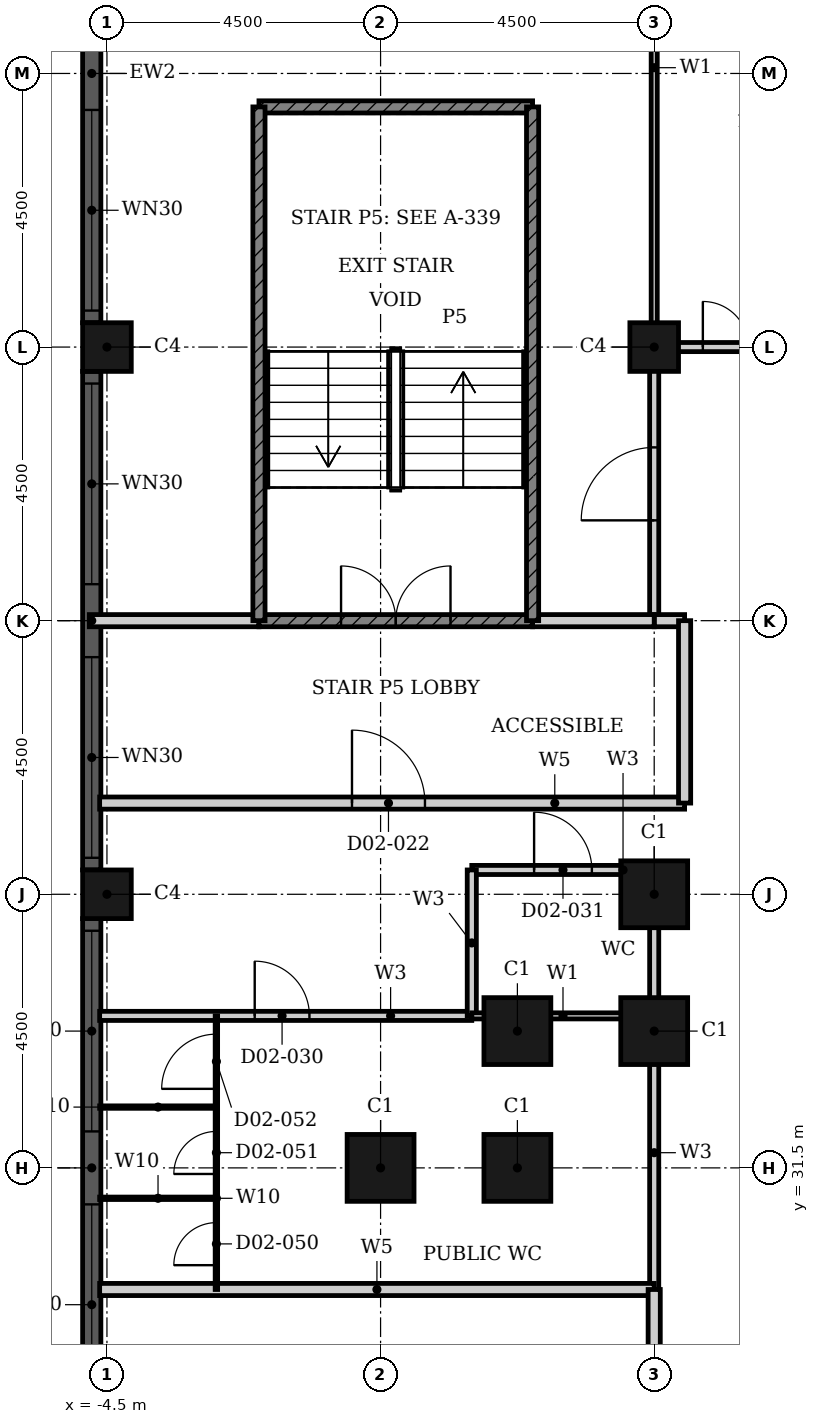
"""IFC4 building model, lengths in metres.
Left out: names, types, materials, properties, quantities, classifications, styles, units other than length and angle.
Written with IfcOpenShell. Run it as: python <this file> out.ifc"""

import sys

from ifc_helpers import new_model, si_unit, direction, frame, frame_2d, origin, origin_2d, place, context, subcontext, project, spatial, rectangle, hollow_rectangle, extrude, element, fill, save


model = new_model("IFC4")
c1 = context("Model", 3, precision=1e-05, world=origin(), true_north=direction((0.0, 1.0)))
c2 = subcontext(c1, "Body", "Model", "MODEL_VIEW")
j1 = project(units=[si_unit("LENGTHUNIT", "METRE"), si_unit("PLANEANGLEUNIT", "RADIAN")], contexts=[c1])
p1 = place(None, origin())
s1 = spatial("IfcSite", under=j1, at=p1, CompositionType="ELEMENT")
p2 = place(p1, origin())
s2 = spatial("IfcBuilding", under=s1, at=p2, CompositionType="ELEMENT")
p3 = place(p2, frame((0.0, 0.0, 12.0)))
s3 = spatial("IfcBuildingStorey", under=s2, at=p3, CompositionType="ELEMENT", Elevation=12.0)
for number, where, z_axis, x_axis in (
    (1, (4.5, 36.0, 0.0), (0.0, 0.0, 1.0), (1.0, 0.0, 0.0)),
    (2, (4.5, 33.75, 0.0), (0.0, 0.0, 1.0), (1.0, 0.0, 0.0)),
    (3, (2.25, 33.75, 0.0), (0.0, 0.0, 1.0), (1.0, 0.0, 0.0)),
    (4, (2.25, 31.5, 0.0), (0.0, 0.0, 1.0), (1.0, 0.0, 0.0)),
    (5, (0.0, 31.5, 0.0), (0.0, 0.0, 1.0), (1.0, 0.0, 0.0)),
):
    element("IfcColumn", number, at=place(p3, frame(where, z_axis=z_axis, x_axis=x_axis)), inside=s3, PredefinedType="COLUMN", context=c2, shape_type="SweptSolid", body=[
        extrude(hollow_rectangle(XDim=1.1, YDim=1.1, WallThickness=0.036, at=origin_2d()), origin(), (0.0, 0.0, 1.0), 5.4),
    ])
for number, where, z_axis, x_axis in (
    (6, (-4.5, 36.0, 0.0), (0.0, 0.0, 1.0), (1.0, 0.0, 0.0)),
    (7, (-4.5, 45.0, 0.0), (0.0, 0.0, 1.0), (1.0, 0.0, 0.0)),
    (8, (4.5, 45.0, 0.0), (0.0, 0.0, 1.0), (1.0, 0.0, 0.0)),
):
    element("IfcColumn", number, at=place(p3, frame(where, z_axis=z_axis, x_axis=x_axis)), inside=s3, PredefinedType="COLUMN", context=c2, shape_type="SweptSolid", body=[
        extrude(hollow_rectangle(XDim=0.8, YDim=0.8, WallThickness=0.025, at=origin_2d()), origin(), (0.0, 0.0, 1.0), 5.4),
    ])
p4 = place(p3, frame((-4.75, 53.6, 0.0), z_axis=(0.0, 0.0, 1.0), x_axis=(0.0, -1.0, 0.0)))
e9 = element("IfcWall", 9, at=p4, inside=s3, PredefinedType="SOLIDWALL", context=c2, shape_type="SweptSolid", body=[
    extrude(rectangle(XDim=8.2, YDim=0.3, at=frame_2d((4.1, 0.0))), origin(), (0.0, 0.0, 1.0), 5.4),
])
p5 = place(p4, frame((0.2, 0.0, 0.9)))
e10 = element("IfcOpeningElement", 10, at=p5, cuts=e9, PredefinedType="OPENING", context=c2, shape_type="SweptSolid", body=[
    extrude(rectangle(XDim=3.3, YDim=3.5, at=frame_2d((1.65, 1.75))), frame((0.0, 0.16, 0.0), z_axis=(0.0, -1.0, 0.0), x_axis=(1.0, 0.0, 0.0)), (0.0, 0.0, 1.0), 0.32),
])
p6 = place(p4, frame((4.7, 0.0, 0.9)))
e11 = element("IfcOpeningElement", 11, at=p6, cuts=e9, PredefinedType="OPENING", context=c2, shape_type="SweptSolid", body=[
    extrude(rectangle(XDim=3.3, YDim=3.5, at=frame_2d((1.65, 1.75))), frame((0.0, 0.16, 0.0), z_axis=(0.0, -1.0, 0.0), x_axis=(1.0, 0.0, 0.0)), (0.0, 0.0, 1.0), 0.32),
])
p7 = place(p3, frame((-4.75, 44.6, 0.0), z_axis=(0.0, 0.0, 1.0), x_axis=(0.0, -1.0, 0.0)))
e12 = element("IfcWall", 12, at=p7, inside=s3, PredefinedType="SOLIDWALL", context=c2, shape_type="SweptSolid", body=[
    extrude(rectangle(XDim=8.2, YDim=0.3, at=frame_2d((4.1, 0.0))), origin(), (0.0, 0.0, 1.0), 5.4),
])
p8 = place(p7, frame((0.2, 0.0, 0.9)))
e13 = element("IfcOpeningElement", 13, at=p8, cuts=e12, PredefinedType="OPENING", context=c2, shape_type="SweptSolid", body=[
    extrude(rectangle(XDim=3.3, YDim=3.5, at=frame_2d((1.65, 1.75))), frame((0.0, 0.16, 0.0), z_axis=(0.0, -1.0, 0.0), x_axis=(1.0, 0.0, 0.0)), (0.0, 0.0, 1.0), 0.32),
])
p9 = place(p7, frame((4.7, 0.0, 0.9)))
e14 = element("IfcOpeningElement", 14, at=p9, cuts=e12, PredefinedType="OPENING", context=c2, shape_type="SweptSolid", body=[
    extrude(rectangle(XDim=3.3, YDim=3.5, at=frame_2d((1.65, 1.75))), frame((0.0, 0.16, 0.0), z_axis=(0.0, -1.0, 0.0), x_axis=(1.0, 0.0, 0.0)), (0.0, 0.0, 1.0), 0.32),
])
p10 = place(p3, frame((-4.75, 35.6, 0.0), z_axis=(0.0, 0.0, 1.0), x_axis=(0.0, -1.0, 0.0)))
e15 = element("IfcWall", 15, at=p10, inside=s3, PredefinedType="SOLIDWALL", context=c2, shape_type="SweptSolid", body=[
    extrude(rectangle(XDim=8.2, YDim=0.3, at=frame_2d((4.1, 0.0))), origin(), (0.0, 0.0, 1.0), 5.4),
])
p11 = place(p10, frame((0.2, 0.0, 0.9)))
e16 = element("IfcOpeningElement", 16, at=p11, cuts=e15, PredefinedType="OPENING", context=c2, shape_type="SweptSolid", body=[
    extrude(rectangle(XDim=3.3, YDim=3.5, at=frame_2d((1.65, 1.75))), frame((0.0, 0.16, 0.0), z_axis=(0.0, -1.0, 0.0), x_axis=(1.0, 0.0, 0.0)), (0.0, 0.0, 1.0), 0.32),
])
p12 = place(p10, frame((4.7, 0.0, 0.9)))
e17 = element("IfcOpeningElement", 17, at=p12, cuts=e15, PredefinedType="OPENING", context=c2, shape_type="SweptSolid", body=[
    extrude(rectangle(XDim=3.3, YDim=3.5, at=frame_2d((1.65, 1.75))), frame((0.0, 0.16, 0.0), z_axis=(0.0, -1.0, 0.0), x_axis=(1.0, 0.0, 0.0)), (0.0, 0.0, 1.0), 0.32),
])
p13 = place(p3, frame((-4.62, 34.0, 0.0), z_axis=(0.0, 0.0, 1.0), x_axis=(1.0, 0.0, 0.0)))
e18 = element("IfcWall", 18, at=p13, inside=s3, PredefinedType="PARTITIONING", context=c2, shape_type="SweptSolid", body=[
    extrude(rectangle(XDim=6.12, YDim=0.15, at=frame_2d((3.06, 0.0))), origin(), (0.0, 0.0, 1.0), 5.05),
])
p14 = place(p13, frame((2.55, 0.0, 0.0)))
e19 = element("IfcOpeningElement", 19, at=p14, cuts=e18, PredefinedType="OPENING", context=c2, shape_type="SweptSolid", body=[
    extrude(rectangle(XDim=0.9, YDim=2.1, at=frame_2d((0.45, 1.05))), frame((0.0, 0.085, 0.0), z_axis=(0.0, -1.0, 0.0), x_axis=(1.0, 0.0, 0.0)), (0.0, 0.0, 1.0), 0.17),
])
p15 = place(p3, frame((1.5, 36.4, 0.0), z_axis=(0.0, 0.0, 1.0), x_axis=(1.0, 0.0, 0.0)))
e20 = element("IfcWall", 20, at=p15, inside=s3, PredefinedType="PARTITIONING", context=c2, shape_type="SweptSolid", body=[
    extrude(rectangle(XDim=3.0, YDim=0.15, at=frame_2d((1.5, 0.0))), origin(), (0.0, 0.0, 1.0), 5.05),
])
p16 = place(p15, frame((1.025, 0.0, 0.0)))
e21 = element("IfcOpeningElement", 21, at=p16, cuts=e20, PredefinedType="OPENING", context=c2, shape_type="SweptSolid", body=[
    extrude(rectangle(XDim=0.95, YDim=2.1, at=frame_2d((0.475, 1.05))), frame((0.0, 0.085, 0.0), z_axis=(0.0, -1.0, 0.0), x_axis=(1.0, 0.0, 0.0)), (0.0, 0.0, 1.0), 0.17),
])
p17 = place(p3, frame((4.5, 45.0, 0.0), z_axis=(0.0, 0.0, 1.0), x_axis=(1.0, 0.0, 0.0)))
e22 = element("IfcWall", 22, at=p17, inside=s3, PredefinedType="PARTITIONING", context=c2, shape_type="SweptSolid", body=[
    extrude(rectangle(XDim=3.1, YDim=0.15, at=frame_2d((1.55, 0.0))), origin(), (0.0, 0.0, 1.0), 5.05),
])
p18 = place(p17, frame((0.8, 0.0, 0.0)))
e23 = element("IfcOpeningElement", 23, at=p18, cuts=e22, PredefinedType="OPENING", context=c2, shape_type="SweptSolid", body=[
    extrude(rectangle(XDim=1.5, YDim=2.4, at=frame_2d((0.75, 1.2))), frame((0.0, 0.085, 0.0), z_axis=(0.0, -1.0, 0.0), x_axis=(1.0, 0.0, 0.0)), (0.0, 0.0, 1.0), 0.17),
])
p19 = place(p3, frame((1.5, 34.0, 0.0), z_axis=(0.0, 0.0, 1.0), x_axis=(0.0, 1.0, 0.0)))
e24 = element("IfcWall", 24, at=p19, inside=s3, PredefinedType="PARTITIONING", context=c2, shape_type="SweptSolid", body=[
    extrude(rectangle(XDim=2.4, YDim=0.15, at=frame_2d((1.2, 0.0))), origin(), (0.0, 0.0, 1.0), 5.05),
])
p20 = place(p3, frame((4.5, 29.5, 0.0), z_axis=(0.0, 0.0, 1.0), x_axis=(0.0, 1.0, 0.0)))
e25 = element("IfcWall", 25, at=p20, inside=s3, PredefinedType="PARTITIONING", context=c2, shape_type="SweptSolid", body=[
    extrude(rectangle(XDim=4.5, YDim=0.15, at=frame_2d((2.25, 0.0))), origin(), (0.0, 0.0, 1.0), 5.05),
])
p21 = place(p3, frame((4.5, 34.0, 0.0), z_axis=(0.0, 0.0, 1.0), x_axis=(0.0, 1.0, 0.0)))
e26 = element("IfcWall", 26, at=p21, inside=s3, PredefinedType="PARTITIONING", context=c2, shape_type="SweptSolid", body=[
    extrude(rectangle(XDim=2.4, YDim=0.15, at=frame_2d((1.2, 0.0))), origin(), (0.0, 0.0, 1.0), 5.05),
])
p22 = place(p3, frame((4.5, 40.5, 0.0), z_axis=(0.0, 0.0, 1.0), x_axis=(0.0, 1.0, 0.0)))
e27 = element("IfcWall", 27, at=p22, inside=s3, PredefinedType="PARTITIONING", context=c2, shape_type="SweptSolid", body=[
    extrude(rectangle(XDim=4.5, YDim=0.15, at=frame_2d((2.25, 0.0))), origin(), (0.0, 0.0, 1.0), 5.05),
])
p23 = place(p22, frame((1.65, 0.0, 0.0)))
e28 = element("IfcOpeningElement", 28, at=p23, cuts=e27, PredefinedType="OPENING", context=c2, shape_type="SweptSolid", body=[
    extrude(rectangle(XDim=1.2, YDim=2.4, at=frame_2d((0.6, 1.2))), frame((0.0, 0.085, 0.0), z_axis=(0.0, -1.0, 0.0), x_axis=(1.0, 0.0, 0.0)), (0.0, 0.0, 1.0), 0.17),
])
p24 = place(p3, frame((1.5, 34.0, 0.0), z_axis=(0.0, 0.0, 1.0), x_axis=(1.0, 0.0, 0.0)))
e29 = element("IfcWall", 29, at=p24, inside=s3, PredefinedType="PARTITIONING", context=c2, shape_type="SweptSolid", body=[
    extrude(rectangle(XDim=3.0, YDim=0.1, at=frame_2d((1.5, 0.0))), origin(), (0.0, 0.0, 1.0), 5.05),
])
p25 = place(p3, frame((4.5, 45.0, 0.0), z_axis=(0.0, 0.0, 1.0), x_axis=(0.0, 1.0, 0.0)))
e30 = element("IfcWall", 30, at=p25, inside=s3, PredefinedType="PARTITIONING", context=c2, shape_type="SweptSolid", body=[
    extrude(rectangle(XDim=9.19, YDim=0.1, at=frame_2d((4.595, 0.0))), origin(), (0.0, 0.0, 1.0), 5.05),
])
p26 = place(p3, frame((-4.62, 29.5, 0.0), z_axis=(0.0, 0.0, 1.0), x_axis=(1.0, 0.0, 0.0)))
e31 = element("IfcWall", 31, at=p26, inside=s3, PredefinedType="PARTITIONING", context=c2, shape_type="SweptSolid", body=[
    extrude(rectangle(XDim=9.12, YDim=0.2, at=frame_2d((4.56, 0.0))), origin(), (0.0, 0.0, 1.0), 5.05),
])
p27 = place(p3, frame((-4.62, 37.5, 0.0), z_axis=(0.0, 0.0, 1.0), x_axis=(1.0, 0.0, 0.0)))
e32 = element("IfcWall", 32, at=p27, inside=s3, PredefinedType="PARTITIONING", context=c2, shape_type="SweptSolid", body=[
    extrude(rectangle(XDim=9.62, YDim=0.2, at=frame_2d((4.81, 0.0))), origin(), (0.0, 0.0, 1.0), 5.05),
])
p28 = place(p27, frame((4.15, 0.0, 0.0)))
e33 = element("IfcOpeningElement", 33, at=p28, cuts=e32, PredefinedType="OPENING", context=c2, shape_type="SweptSolid", body=[
    extrude(rectangle(XDim=1.2, YDim=2.1, at=frame_2d((0.6, 1.05))), frame((0.0, 0.11, 0.0), z_axis=(0.0, -1.0, 0.0), x_axis=(1.0, 0.0, 0.0)), (0.0, 0.0, 1.0), 0.22),
])
p29 = place(p3, frame((4.5, 40.5, 0.0), z_axis=(0.0, 0.0, 1.0), x_axis=(1.0, 0.0, 0.0)))
e34 = element("IfcWall", 34, at=p29, inside=s3, PredefinedType="PARTITIONING", context=c2, shape_type="SweptSolid", body=[
    extrude(rectangle(XDim=0.5, YDim=0.2, at=frame_2d((0.25, 0.0))), origin(), (0.0, 0.0, 1.0), 5.05),
])
p30 = place(p3, frame((-4.79, 40.5, 0.0), z_axis=(0.0, 0.0, 1.0), x_axis=(1.0, 0.0, 0.0)))
e35 = element("IfcWall", 35, at=p30, inside=s3, PredefinedType="PARTITIONING", context=c2, shape_type="SweptSolid", body=[
    extrude(rectangle(XDim=2.79, YDim=0.2, at=frame_2d((1.395, 0.0))), origin(), (0.0, 0.0, 1.0), 5.05),
])
p31 = place(p3, frame((2.5, 40.5, 0.0), z_axis=(0.0, 0.0, 1.0), x_axis=(1.0, 0.0, 0.0)))
e36 = element("IfcWall", 36, at=p31, inside=s3, PredefinedType="PARTITIONING", context=c2, shape_type="SweptSolid", body=[
    extrude(rectangle(XDim=2.0, YDim=0.2, at=frame_2d((1.0, 0.0))), origin(), (0.0, 0.0, 1.0), 5.05),
])
p32 = place(p3, frame((4.5, 17.75, 0.0), z_axis=(0.0, 0.0, 1.0), x_axis=(0.0, 1.0, 0.0)))
e37 = element("IfcWall", 37, at=p32, inside=s3, PredefinedType="PARTITIONING", context=c2, shape_type="SweptSolid", body=[
    extrude(rectangle(XDim=11.75, YDim=0.2, at=frame_2d((5.875, 0.0))), origin(), (0.0, 0.0, 1.0), 5.05),
])
p33 = place(p32, frame((5.375, 0.0, 0.0)))
e38 = element("IfcOpeningElement", 38, at=p33, cuts=e37, PredefinedType="OPENING", context=c2, shape_type="SweptSolid", body=[
    extrude(rectangle(XDim=1.0, YDim=2.1, at=frame_2d((0.5, 1.05))), frame((0.0, 0.11, 0.0), z_axis=(0.0, -1.0, 0.0), x_axis=(1.0, 0.0, 0.0)), (0.0, 0.0, 1.0), 0.22),
])
p34 = place(p3, frame((5.0, 37.5, 0.0), z_axis=(0.0, 0.0, 1.0), x_axis=(0.0, 1.0, 0.0)))
e39 = element("IfcWall", 39, at=p34, inside=s3, PredefinedType="PARTITIONING", context=c2, shape_type="SweptSolid", body=[
    extrude(rectangle(XDim=3.0, YDim=0.2, at=frame_2d((1.5, 0.0))), origin(), (0.0, 0.0, 1.0), 5.05),
])
p35 = place(p3, frame((-2.0, 40.5, 0.0), z_axis=(0.0, 0.0, 1.0), x_axis=(1.0, 0.0, 0.0)))
e40 = element("IfcWall", 40, at=p35, inside=s3, PredefinedType="SHEAR", context=c2, shape_type="SweptSolid", body=[
    extrude(rectangle(XDim=4.5, YDim=0.2, at=frame_2d((2.25, 0.0))), origin(), (0.0, 0.0, 1.0), 5.05),
])
p36 = place(p35, frame((1.35, 0.0, 0.0)))
e41 = element("IfcOpeningElement", 41, at=p36, cuts=e40, PredefinedType="OPENING", context=c2, shape_type="SweptSolid", body=[
    extrude(rectangle(XDim=1.8, YDim=2.1, at=frame_2d((0.9, 1.05))), frame((0.0, 0.11, 0.0), z_axis=(0.0, -1.0, 0.0), x_axis=(1.0, 0.0, 0.0)), (0.0, 0.0, 1.0), 0.22),
])
p37 = place(p3, frame((-2.0, 48.95, 0.0), z_axis=(0.0, 0.0, 1.0), x_axis=(1.0, 0.0, 0.0)))
e42 = element("IfcWall", 42, at=p37, inside=s3, PredefinedType="SHEAR", context=c2, shape_type="SweptSolid", body=[
    extrude(rectangle(XDim=4.5, YDim=0.2, at=frame_2d((2.25, 0.0))), origin(), (0.0, 0.0, 1.0), 5.05),
])
for number, where, z_axis, x_axis in (
    (43, (-2.0, 40.5, 0.0), (0.0, 0.0, 1.0), (0.0, 1.0, 0.0)),
    (44, (2.5, 40.5, 0.0), (0.0, 0.0, 1.0), (0.0, 1.0, 0.0)),
):
    element("IfcWall", number, at=place(p3, frame(where, z_axis=z_axis, x_axis=x_axis)), inside=s3, PredefinedType="SHEAR", context=c2, shape_type="SweptSolid", body=[
        extrude(rectangle(XDim=8.45, YDim=0.2, at=frame_2d((4.225, 0.0))), origin(), (0.0, 0.0, 1.0), 5.05),
    ])
for number, where, z_axis, x_axis in (
    (45, (-4.62, 31.0, 0.0), (0.0, 0.0, 1.0), (1.0, 0.0, 0.0)),
    (46, (-4.62, 32.5, 0.0), (0.0, 0.0, 1.0), (1.0, 0.0, 0.0)),
):
    element("IfcWall", number, at=place(p3, frame(where, z_axis=z_axis, x_axis=x_axis)), inside=s3, PredefinedType="PARTITIONING", context=c2, shape_type="SweptSolid", body=[
        extrude(rectangle(XDim=1.92, YDim=0.04, at=frame_2d((0.96, 0.0))), origin(), (0.0, 0.0, 1.0), 5.05),
    ])
p38 = place(p3, frame((-2.7, 29.5, 0.0), z_axis=(0.0, 0.0, 1.0), x_axis=(0.0, 1.0, 0.0)))
e47 = element("IfcWall", 47, at=p38, inside=s3, PredefinedType="PARTITIONING", context=c2, shape_type="SweptSolid", body=[
    extrude(rectangle(XDim=4.5, YDim=0.04, at=frame_2d((2.25, 0.0))), origin(), (0.0, 0.0, 1.0), 5.05),
])
p39 = place(p38, frame((0.4, 0.0, 0.0)))
e48 = element("IfcOpeningElement", 48, at=p39, cuts=e47, PredefinedType="OPENING", context=c2, shape_type="SweptSolid", body=[
    extrude(rectangle(XDim=0.7, YDim=2.0, at=frame_2d((0.35, 1.0))), frame((0.0, 0.03, 0.0), z_axis=(0.0, -1.0, 0.0), x_axis=(1.0, 0.0, 0.0)), (0.0, 0.0, 1.0), 0.06),
])
p40 = place(p38, frame((1.9, 0.0, 0.0)))
e49 = element("IfcOpeningElement", 49, at=p40, cuts=e47, PredefinedType="OPENING", context=c2, shape_type="SweptSolid", body=[
    extrude(rectangle(XDim=0.7, YDim=2.0, at=frame_2d((0.35, 1.0))), frame((0.0, 0.03, 0.0), z_axis=(0.0, -1.0, 0.0), x_axis=(1.0, 0.0, 0.0)), (0.0, 0.0, 1.0), 0.06),
])
p41 = place(p38, frame((3.3, 0.0, 0.0)))
e50 = element("IfcOpeningElement", 50, at=p41, cuts=e47, PredefinedType="OPENING", context=c2, shape_type="SweptSolid", body=[
    extrude(rectangle(XDim=0.9, YDim=2.0, at=frame_2d((0.45, 1.0))), frame((0.0, 0.03, 0.0), z_axis=(0.0, -1.0, 0.0), x_axis=(1.0, 0.0, 0.0)), (0.0, 0.0, 1.0), 0.06),
])
p42 = place(p6, origin())
e51 = element("IfcWindow", 51, at=p42, inside=s3, PartitioningType="SINGLE_PANEL", PredefinedType="WINDOW", context=c2, shape_type="SweptSolid", body=[
    extrude(rectangle(XDim=3.3, YDim=3.5, at=frame_2d((1.65, 1.75))), frame((0.0, 0.03, 0.0), z_axis=(0.0, -1.0, 0.0), x_axis=(1.0, 0.0, 0.0)), (0.0, 0.0, 1.0), 0.06),
])
fill(e11, e51)
p43 = place(p8, origin())
e52 = element("IfcWindow", 52, at=p43, inside=s3, PartitioningType="SINGLE_PANEL", PredefinedType="WINDOW", context=c2, shape_type="SweptSolid", body=[
    extrude(rectangle(XDim=3.3, YDim=3.5, at=frame_2d((1.65, 1.75))), frame((0.0, 0.03, 0.0), z_axis=(0.0, -1.0, 0.0), x_axis=(1.0, 0.0, 0.0)), (0.0, 0.0, 1.0), 0.06),
])
fill(e13, e52)
p44 = place(p9, origin())
e53 = element("IfcWindow", 53, at=p44, inside=s3, PartitioningType="SINGLE_PANEL", PredefinedType="WINDOW", context=c2, shape_type="SweptSolid", body=[
    extrude(rectangle(XDim=3.3, YDim=3.5, at=frame_2d((1.65, 1.75))), frame((0.0, 0.03, 0.0), z_axis=(0.0, -1.0, 0.0), x_axis=(1.0, 0.0, 0.0)), (0.0, 0.0, 1.0), 0.06),
])
fill(e14, e53)
p45 = place(p11, origin())
e54 = element("IfcWindow", 54, at=p45, inside=s3, PartitioningType="SINGLE_PANEL", PredefinedType="WINDOW", context=c2, shape_type="SweptSolid", body=[
    extrude(rectangle(XDim=3.3, YDim=3.5, at=frame_2d((1.65, 1.75))), frame((0.0, 0.03, 0.0), z_axis=(0.0, -1.0, 0.0), x_axis=(1.0, 0.0, 0.0)), (0.0, 0.0, 1.0), 0.06),
])
fill(e16, e54)
p46 = place(p12, origin())
e55 = element("IfcWindow", 55, at=p46, inside=s3, PartitioningType="SINGLE_PANEL", PredefinedType="WINDOW", context=c2, shape_type="SweptSolid", body=[
    extrude(rectangle(XDim=3.3, YDim=3.5, at=frame_2d((1.65, 1.75))), frame((0.0, 0.03, 0.0), z_axis=(0.0, -1.0, 0.0), x_axis=(1.0, 0.0, 0.0)), (0.0, 0.0, 1.0), 0.06),
])
fill(e17, e55)
p47 = place(p28, origin())
e56 = element("IfcDoor", 56, at=p47, inside=s3, OperationType="SINGLE_SWING_RIGHT", PredefinedType="DOOR", context=c2, shape_type="SweptSolid", body=[
    extrude(rectangle(XDim=1.2, YDim=2.1, at=frame_2d((0.6, 1.05))), frame((0.0, 0.025, 0.0), z_axis=(0.0, -1.0, 0.0), x_axis=(1.0, 0.0, 0.0)), (0.0, 0.0, 1.0), 0.05),
])
fill(e33, e56)
p48 = place(p36, origin())
e57 = element("IfcDoor", 57, at=p48, inside=s3, OperationType="DOUBLE_DOOR_SINGLE_SWING", PredefinedType="DOOR", context=c2, shape_type="SweptSolid", body=[
    extrude(rectangle(XDim=1.8, YDim=2.1, at=frame_2d((0.9, 1.05))), frame((0.0, 0.025, 0.0), z_axis=(0.0, -1.0, 0.0), x_axis=(1.0, 0.0, 0.0)), (0.0, 0.0, 1.0), 0.05),
])
fill(e41, e57)
p49 = place(p14, origin())
e58 = element("IfcDoor", 58, at=p49, inside=s3, OperationType="SINGLE_SWING_LEFT", PredefinedType="DOOR", context=c2, shape_type="SweptSolid", body=[
    extrude(rectangle(XDim=0.9, YDim=2.1, at=frame_2d((0.45, 1.05))), frame((0.0, 0.025, 0.0), z_axis=(0.0, -1.0, 0.0), x_axis=(1.0, 0.0, 0.0)), (0.0, 0.0, 1.0), 0.05),
])
fill(e19, e58)
p50 = place(p16, origin())
e59 = element("IfcDoor", 59, at=p50, inside=s3, OperationType="SINGLE_SWING_LEFT", PredefinedType="DOOR", context=c2, shape_type="SweptSolid", body=[
    extrude(rectangle(XDim=0.95, YDim=2.1, at=frame_2d((0.475, 1.05))), frame((0.0, 0.025, 0.0), z_axis=(0.0, -1.0, 0.0), x_axis=(1.0, 0.0, 0.0)), (0.0, 0.0, 1.0), 0.05),
])
fill(e21, e59)
p51 = place(p23, origin())
e60 = element("IfcDoor", 60, at=p51, inside=s3, OperationType="SINGLE_SWING_LEFT", PredefinedType="DOOR", context=c2, shape_type="SweptSolid", body=[
    extrude(rectangle(XDim=1.2, YDim=2.4, at=frame_2d((0.6, 1.2))), frame((0.0, 0.025, 0.0), z_axis=(0.0, -1.0, 0.0), x_axis=(1.0, 0.0, 0.0)), (0.0, 0.0, 1.0), 0.05),
])
fill(e28, e60)
p52 = place(p18, origin())
e61 = element("IfcDoor", 61, at=p52, inside=s3, OperationType="DOUBLE_DOOR_SINGLE_SWING", PredefinedType="DOOR", context=c2, shape_type="SweptSolid", body=[
    extrude(rectangle(XDim=1.5, YDim=2.4, at=frame_2d((0.75, 1.2))), frame((0.0, 0.025, 0.0), z_axis=(0.0, -1.0, 0.0), x_axis=(1.0, 0.0, 0.0)), (0.0, 0.0, 1.0), 0.05),
])
fill(e23, e61)
p53 = place(p39, origin())
e62 = element("IfcDoor", 62, at=p53, inside=s3, OperationType="SINGLE_SWING_LEFT", PredefinedType="DOOR", context=c2, shape_type="SweptSolid", body=[
    extrude(rectangle(XDim=0.7, YDim=2.0, at=frame_2d((0.35, 1.0))), frame((0.0, 0.02, 0.0), z_axis=(0.0, -1.0, 0.0), x_axis=(1.0, 0.0, 0.0)), (0.0, 0.0, 1.0), 0.04),
])
fill(e48, e62)
p54 = place(p40, origin())
e63 = element("IfcDoor", 63, at=p54, inside=s3, OperationType="SINGLE_SWING_LEFT", PredefinedType="DOOR", context=c2, shape_type="SweptSolid", body=[
    extrude(rectangle(XDim=0.7, YDim=2.0, at=frame_2d((0.35, 1.0))), frame((0.0, 0.02, 0.0), z_axis=(0.0, -1.0, 0.0), x_axis=(1.0, 0.0, 0.0)), (0.0, 0.0, 1.0), 0.04),
])
fill(e49, e63)
p55 = place(p41, origin())
e64 = element("IfcDoor", 64, at=p55, inside=s3, OperationType="SINGLE_SWING_RIGHT", PredefinedType="DOOR", context=c2, shape_type="SweptSolid", body=[
    extrude(rectangle(XDim=0.9, YDim=2.0, at=frame_2d((0.45, 1.0))), frame((0.0, 0.02, 0.0), z_axis=(0.0, -1.0, 0.0), x_axis=(1.0, 0.0, 0.0)), (0.0, 0.0, 1.0), 0.04),
])
fill(e50, e64)
save(model, sys.argv[1])
